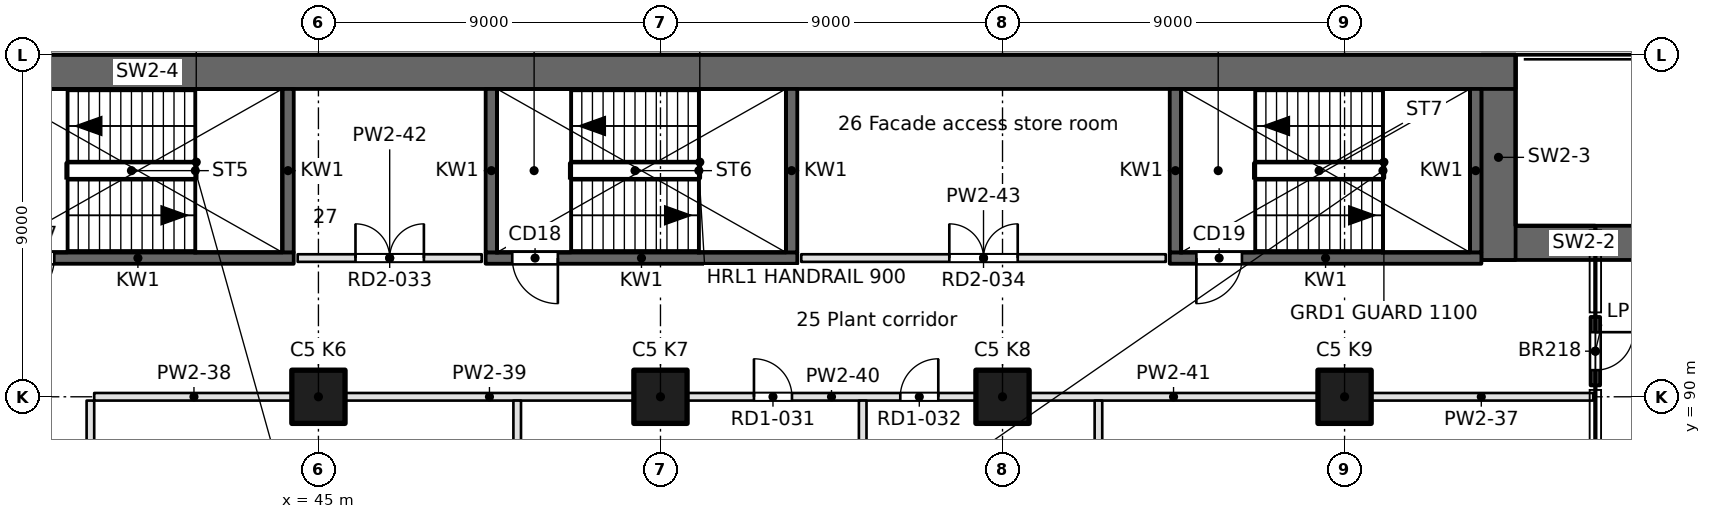
"""IFC4 building model, lengths in metres.
Left out: names, types, materials, properties, quantities, classifications, styles, units other than length and angle.
Written with IfcOpenShell. Run it as: python <this file> out.ifc"""

import sys

from ifc_helpers import new_model, si_unit, direction, frame, frame_2d, origin, origin_2d, place, context, subcontext, project, spatial, rectangle, extrude, element, fill, save


model = new_model("IFC4")
c1 = context("Model", 3, precision=1e-05, world=origin(), true_north=direction((0.0, 1.0)))
c2 = subcontext(c1, "Body", "Model", "MODEL_VIEW")
j1 = project(units=[si_unit("LENGTHUNIT", "METRE"), si_unit("PLANEANGLEUNIT", "RADIAN")], contexts=[c1])
p1 = place(None, origin())
s1 = spatial("IfcSite", under=j1, at=p1, CompositionType="ELEMENT")
p2 = place(p1, origin())
s2 = spatial("IfcBuilding", under=s1, at=p2, CompositionType="ELEMENT")
p3 = place(p2, frame((0.0, 0.0, 80.2)))
s3 = spatial("IfcBuildingStorey", under=s2, at=p3, CompositionType="ELEMENT", Elevation=80.2)
for number, where, z_axis, x_axis in (
    (1, (45.0, 90.0, 0.0), (0.0, 0.0, 1.0), (1.0, 0.0, 0.0)),
    (2, (54.0, 90.0, 0.0), (0.0, 0.0, 1.0), (1.0, 0.0, 0.0)),
    (3, (63.0, 90.0, 0.0), (0.0, 0.0, 1.0), (1.0, 0.0, 0.0)),
    (4, (72.0, 90.0, 0.0), (0.0, 0.0, 1.0), (1.0, 0.0, 0.0)),
):
    element("IfcColumn", number, at=place(p3, frame(where, z_axis=z_axis, x_axis=x_axis)), inside=s3, PredefinedType="COLUMN", context=c2, shape_type="SweptSolid", body=[
        extrude(rectangle(XDim=1.4, YDim=1.4, at=origin_2d()), origin(), (0.0, 0.0, 1.0), 4.6),
    ])
p4 = place(p3, frame((81.0, 94.05, 0.0), z_axis=(0.0, 0.0, 1.0), x_axis=(-1.0, 0.0, 0.0)))
e5 = element("IfcWall", 5, at=p4, inside=s3, PredefinedType="SHEAR", context=c2, shape_type="SweptSolid", body=[
    extrude(rectangle(XDim=5.4, YDim=0.9, at=frame_2d((2.7, 0.0))), origin(), (0.0, 0.0, 1.0), 4.6),
])
p5 = place(p3, frame((76.05, 93.6, 0.0), z_axis=(0.0, 0.0, 1.0), x_axis=(0.0, 1.0, 0.0)))
e6 = element("IfcWall", 6, at=p5, inside=s3, PredefinedType="SHEAR", context=c2, shape_type="SweptSolid", body=[
    extrude(rectangle(XDim=5.4, YDim=0.9, at=frame_2d((2.7, 0.0))), origin(), (0.0, 0.0, 1.0), 4.6),
])
p6 = place(p3, frame((76.5, 98.55, 0.0), z_axis=(0.0, 0.0, 1.0), x_axis=(-1.0, 0.0, 0.0)))
e7 = element("IfcWall", 7, at=p6, inside=s3, PredefinedType="SHEAR", context=c2, shape_type="SweptSolid", body=[
    extrude(rectangle(XDim=72.0, YDim=0.9, at=frame_2d((36.0, 0.0))), origin(), (0.0, 0.0, 1.0), 4.6),
])
p7 = place(p3, frame((78.599, 90.3, 0.0), z_axis=(0.0, 0.0, 1.0), x_axis=(0.0, 1.0, 0.0)))
e8 = element("IfcWall", 8, at=p7, inside=s3, PredefinedType="SOLIDWALL", context=c2, shape_type="SweptSolid", body=[
    extrude(rectangle(XDim=1.8, YDim=0.25, at=frame_2d((0.9, 0.0))), origin(), (0.0, 0.0, 1.0), 4.2),
])
p8 = place(p7, frame((0.4, 0.0, 0.0)))
e9 = element("IfcOpeningElement", 9, at=p8, cuts=e8, PredefinedType="OPENING", context=c2, shape_type="SweptSolid", body=[
    extrude(rectangle(XDim=1.0, YDim=2.1, at=frame_2d((0.5, 1.05))), frame((0.0, 0.125, 0.0), z_axis=(0.0, -1.0, 0.0), x_axis=(1.0, 0.0, 0.0)), (0.0, 0.0, 1.0), 0.25),
])
p9 = place(p3, frame((36.15, 93.65, -0.45), z_axis=(0.0, 0.0, 1.0), x_axis=(1.0, 0.0, 0.0)))
e10 = element("IfcWall", 10, at=p9, inside=s3, PredefinedType="SOLIDWALL", context=c2, shape_type="SweptSolid", body=[
    extrude(rectangle(XDim=8.2, YDim=0.3, at=frame_2d((4.1, 0.0))), origin(), (0.0, 0.0, 1.0), 4.65),
])
p10 = place(p9, frame((0.7, 0.0, 0.45)))
e11 = element("IfcOpeningElement", 11, at=p10, cuts=e10, PredefinedType="OPENING", context=c2, shape_type="SweptSolid", body=[
    extrude(rectangle(XDim=1.2, YDim=2.1, at=frame_2d((0.6, 1.05))), frame((0.0, 0.15, 0.0), z_axis=(0.0, -1.0, 0.0), x_axis=(1.0, 0.0, 0.0)), (0.0, 0.0, 1.0), 0.3),
])
p11 = place(p3, frame((49.4, 93.65, -0.45), z_axis=(0.0, 0.0, 1.0), x_axis=(1.0, 0.0, 0.0)))
e12 = element("IfcWall", 12, at=p11, inside=s3, PredefinedType="SOLIDWALL", context=c2, shape_type="SweptSolid", body=[
    extrude(rectangle(XDim=8.2, YDim=0.3, at=frame_2d((4.1, 0.0))), origin(), (0.0, 0.0, 1.0), 4.65),
])
p12 = place(p11, frame((0.7, 0.0, 0.45)))
e13 = element("IfcOpeningElement", 13, at=p12, cuts=e12, PredefinedType="OPENING", context=c2, shape_type="SweptSolid", body=[
    extrude(rectangle(XDim=1.2, YDim=2.1, at=frame_2d((0.6, 1.05))), frame((0.0, 0.15, 0.0), z_axis=(0.0, -1.0, 0.0), x_axis=(1.0, 0.0, 0.0)), (0.0, 0.0, 1.0), 0.3),
])
p13 = place(p3, frame((67.4, 93.65, -0.45), z_axis=(0.0, 0.0, 1.0), x_axis=(1.0, 0.0, 0.0)))
e14 = element("IfcWall", 14, at=p13, inside=s3, PredefinedType="SOLIDWALL", context=c2, shape_type="SweptSolid", body=[
    extrude(rectangle(XDim=8.2, YDim=0.3, at=frame_2d((4.1, 0.0))), origin(), (0.0, 0.0, 1.0), 4.65),
])
p14 = place(p13, frame((0.7, 0.0, 0.45)))
e15 = element("IfcOpeningElement", 15, at=p14, cuts=e14, PredefinedType="OPENING", context=c2, shape_type="SweptSolid", body=[
    extrude(rectangle(XDim=1.2, YDim=2.1, at=frame_2d((0.6, 1.05))), frame((0.0, 0.15, 0.0), z_axis=(0.0, -1.0, 0.0), x_axis=(1.0, 0.0, 0.0)), (0.0, 0.0, 1.0), 0.3),
])
for number, where, z_axis, x_axis in (
    (16, (44.2, 93.8, -0.45), (0.0, 0.0, 1.0), (0.0, 1.0, 0.0)),
    (17, (49.55, 93.8, -0.45), (0.0, 0.0, 1.0), (0.0, 1.0, 0.0)),
    (18, (57.45, 93.8, -0.45), (0.0, 0.0, 1.0), (0.0, 1.0, 0.0)),
    (19, (67.55, 93.8, -0.45), (0.0, 0.0, 1.0), (0.0, 1.0, 0.0)),
    (20, (75.45, 93.8, -0.45), (0.0, 0.0, 1.0), (0.0, 1.0, 0.0)),
):
    element("IfcWall", number, at=place(p3, frame(where, z_axis=z_axis, x_axis=x_axis)), inside=s3, PredefinedType="SOLIDWALL", context=c2, shape_type="SweptSolid", body=[
        extrude(rectangle(XDim=4.3, YDim=0.3, at=frame_2d((2.15, 0.0))), origin(), (0.0, 0.0, 1.0), 4.65),
    ])
p15 = place(p3, frame((78.545, 90.0, 0.0), z_axis=(0.0, 0.0, 1.0), x_axis=(-1.0, 0.0, 0.0)))
e21 = element("IfcWall", 21, at=p15, inside=s3, PredefinedType="PARTITIONING", context=c2, shape_type="SweptSolid", body=[
    extrude(rectangle(XDim=5.895, YDim=0.2, at=frame_2d((2.948, 0.0))), origin(), (0.0, 0.0, 1.0), 4.2),
])
p16 = place(p3, frame((44.35, 90.0, 0.0), z_axis=(0.0, 0.0, 1.0), x_axis=(-1.0, 0.0, 0.0)))
e22 = element("IfcWall", 22, at=p16, inside=s3, PredefinedType="PARTITIONING", context=c2, shape_type="SweptSolid", body=[
    extrude(rectangle(XDim=5.25, YDim=0.2, at=frame_2d((2.625, 0.0))), origin(), (0.0, 0.0, 1.0), 4.2),
])
p17 = place(p3, frame((53.35, 90.0, 0.0), z_axis=(0.0, 0.0, 1.0), x_axis=(-1.0, 0.0, 0.0)))
e23 = element("IfcWall", 23, at=p17, inside=s3, PredefinedType="PARTITIONING", context=c2, shape_type="SweptSolid", body=[
    extrude(rectangle(XDim=7.7, YDim=0.2, at=frame_2d((3.85, 0.0))), origin(), (0.0, 0.0, 1.0), 4.2),
])
p18 = place(p3, frame((62.35, 90.0, 0.0), z_axis=(0.0, 0.0, 1.0), x_axis=(-1.0, 0.0, 0.0)))
e24 = element("IfcWall", 24, at=p18, inside=s3, PredefinedType="PARTITIONING", context=c2, shape_type="SweptSolid", body=[
    extrude(rectangle(XDim=7.7, YDim=0.2, at=frame_2d((3.85, 0.0))), origin(), (0.0, 0.0, 1.0), 4.2),
])
p19 = place(p18, frame((4.89, 0.0, 0.0)))
e25 = element("IfcOpeningElement", 25, at=p19, cuts=e24, PredefinedType="OPENING", context=c2, shape_type="SweptSolid", body=[
    extrude(rectangle(XDim=1.0, YDim=2.1, at=frame_2d((0.5, 1.05))), frame((0.0, 0.1, 0.0), z_axis=(0.0, -1.0, 0.0), x_axis=(1.0, 0.0, 0.0)), (0.0, 0.0, 1.0), 0.2),
])
p20 = place(p18, frame((1.04, 0.0, 0.0)))
e26 = element("IfcOpeningElement", 26, at=p20, cuts=e24, PredefinedType="OPENING", context=c2, shape_type="SweptSolid", body=[
    extrude(rectangle(XDim=1.0, YDim=2.1, at=frame_2d((0.5, 1.05))), frame((0.0, 0.1, 0.0), z_axis=(0.0, -1.0, 0.0), x_axis=(1.0, 0.0, 0.0)), (0.0, 0.0, 1.0), 0.2),
])
p21 = place(p3, frame((71.35, 90.0, 0.0), z_axis=(0.0, 0.0, 1.0), x_axis=(-1.0, 0.0, 0.0)))
e27 = element("IfcWall", 27, at=p21, inside=s3, PredefinedType="PARTITIONING", context=c2, shape_type="SweptSolid", body=[
    extrude(rectangle(XDim=7.7, YDim=0.2, at=frame_2d((3.85, 0.0))), origin(), (0.0, 0.0, 1.0), 4.2),
])
p22 = place(p3, frame((44.454, 93.65, 0.0), z_axis=(0.0, 0.0, 1.0), x_axis=(1.0, 0.0, 0.0)))
e28 = element("IfcWall", 28, at=p22, inside=s3, PredefinedType="PARTITIONING", context=c2, shape_type="SweptSolid", body=[
    extrude(rectangle(XDim=4.842, YDim=0.2, at=frame_2d((2.421, 0.0))), origin(), (0.0, 0.0, 1.0), 4.2),
])
p23 = place(p22, frame((1.521, 0.0, 0.0)))
e29 = element("IfcOpeningElement", 29, at=p23, cuts=e28, PredefinedType="OPENING", context=c2, shape_type="SweptSolid", body=[
    extrude(rectangle(XDim=1.8, YDim=2.1, at=frame_2d((0.9, 1.05))), frame((0.0, 0.1, 0.0), z_axis=(0.0, -1.0, 0.0), x_axis=(1.0, 0.0, 0.0)), (0.0, 0.0, 1.0), 0.2),
])
p24 = place(p3, frame((57.704, 93.65, 0.0), z_axis=(0.0, 0.0, 1.0), x_axis=(1.0, 0.0, 0.0)))
e30 = element("IfcWall", 30, at=p24, inside=s3, PredefinedType="PARTITIONING", context=c2, shape_type="SweptSolid", body=[
    extrude(rectangle(XDim=9.592, YDim=0.2, at=frame_2d((4.796, 0.0))), origin(), (0.0, 0.0, 1.0), 4.2),
])
p25 = place(p24, frame((3.896, 0.0, 0.0)))
e31 = element("IfcOpeningElement", 31, at=p25, cuts=e30, PredefinedType="OPENING", context=c2, shape_type="SweptSolid", body=[
    extrude(rectangle(XDim=1.8, YDim=2.1, at=frame_2d((0.9, 1.05))), frame((0.0, 0.1, 0.0), z_axis=(0.0, -1.0, 0.0), x_axis=(1.0, 0.0, 0.0)), (0.0, 0.0, 1.0), 0.2),
])
p26 = place(p3, frame((39.0, 89.9, 0.0), z_axis=(0.0, 0.0, 1.0), x_axis=(0.0, -1.0, 0.0)))
e32 = element("IfcWall", 32, at=p26, inside=s3, PredefinedType="PARTITIONING", context=c2, shape_type="SweptSolid", body=[
    extrude(rectangle(XDim=20.92, YDim=0.2, at=frame_2d((10.46, 0.0))), origin(), (0.0, 0.0, 1.0), 4.2),
])
p27 = place(p26, frame((3.533, 0.0, 0.0)))
e33 = element("IfcOpeningElement", 33, at=p27, cuts=e32, PredefinedType="OPENING", context=c2, shape_type="SweptSolid", body=[
    extrude(rectangle(XDim=1.0, YDim=2.1, at=frame_2d((0.5, 1.05))), frame((0.0, 0.1, 0.0), z_axis=(0.0, -1.0, 0.0), x_axis=(1.0, 0.0, 0.0)), (0.0, 0.0, 1.0), 0.2),
])
for number, where, z_axis, x_axis in (
    (34, (50.23, 89.9, 0.0), (0.0, 0.0, 1.0), (0.0, -1.0, 0.0)),
    (35, (59.321, 89.9, 0.0), (0.0, 0.0, 1.0), (0.0, -1.0, 0.0)),
    (36, (65.524, 89.9, 0.0), (0.0, 0.0, 1.0), (0.0, -1.0, 0.0)),
):
    element("IfcWall", number, at=place(p3, frame(where, z_axis=z_axis, x_axis=x_axis)), inside=s3, PredefinedType="PARTITIONING", context=c2, shape_type="SweptSolid", body=[
        extrude(rectangle(XDim=7.9, YDim=0.2, at=frame_2d((3.95, 0.0))), origin(), (0.0, 0.0, 1.0), 4.2),
    ])
p28 = place(p8, frame((1.0, 0.0, 0.0), z_axis=(0.0, 0.0, 1.0), x_axis=(-1.0, 0.0, 0.0)))
e37 = element("IfcDoor", 37, at=p28, inside=s3, OperationType="SINGLE_SWING_LEFT", PredefinedType="DOOR", context=c2, shape_type="SweptSolid", body=[
    extrude(rectangle(XDim=1.0, YDim=2.1, at=frame_2d((0.5, 1.05))), frame((0.0, 0.025, 0.0), z_axis=(0.0, -1.0, 0.0), x_axis=(1.0, 0.0, 0.0)), (0.0, 0.0, 1.0), 0.05),
])
fill(e9, e37)
p29 = place(p10, frame((1.2, 0.0, 0.0), z_axis=(0.0, 0.0, 1.0), x_axis=(-1.0, 0.0, 0.0)))
e38 = element("IfcDoor", 38, at=p29, inside=s3, OperationType="SINGLE_SWING_RIGHT", PredefinedType="DOOR", context=c2, shape_type="SweptSolid", body=[
    extrude(rectangle(XDim=1.2, YDim=2.1, at=frame_2d((0.6, 1.05))), frame((0.0, 0.025, 0.0), z_axis=(0.0, -1.0, 0.0), x_axis=(1.0, 0.0, 0.0)), (0.0, 0.0, 1.0), 0.05),
])
fill(e11, e38)
p30 = place(p12, frame((1.2, 0.0, 0.0), z_axis=(0.0, 0.0, 1.0), x_axis=(-1.0, 0.0, 0.0)))
e39 = element("IfcDoor", 39, at=p30, inside=s3, OperationType="SINGLE_SWING_LEFT", PredefinedType="DOOR", context=c2, shape_type="SweptSolid", body=[
    extrude(rectangle(XDim=1.2, YDim=2.1, at=frame_2d((0.6, 1.05))), frame((0.0, 0.025, 0.0), z_axis=(0.0, -1.0, 0.0), x_axis=(1.0, 0.0, 0.0)), (0.0, 0.0, 1.0), 0.05),
])
fill(e13, e39)
p31 = place(p14, frame((1.2, 0.0, 0.0), z_axis=(0.0, 0.0, 1.0), x_axis=(-1.0, 0.0, 0.0)))
e40 = element("IfcDoor", 40, at=p31, inside=s3, OperationType="SINGLE_SWING_RIGHT", PredefinedType="DOOR", context=c2, shape_type="SweptSolid", body=[
    extrude(rectangle(XDim=1.2, YDim=2.1, at=frame_2d((0.6, 1.05))), frame((0.0, 0.025, 0.0), z_axis=(0.0, -1.0, 0.0), x_axis=(1.0, 0.0, 0.0)), (0.0, 0.0, 1.0), 0.05),
])
fill(e15, e40)
p32 = place(p19, frame((1.0, 0.0, 0.0), z_axis=(0.0, 0.0, 1.0), x_axis=(-1.0, 0.0, 0.0)))
e41 = element("IfcDoor", 41, at=p32, inside=s3, OperationType="SINGLE_SWING_LEFT", PredefinedType="DOOR", context=c2, shape_type="SweptSolid", body=[
    extrude(rectangle(XDim=1.0, YDim=2.1, at=frame_2d((0.5, 1.05))), frame((0.0, 0.025, 0.0), z_axis=(0.0, -1.0, 0.0), x_axis=(1.0, 0.0, 0.0)), (0.0, 0.0, 1.0), 0.05),
])
fill(e25, e41)
p33 = place(p20, frame((1.0, 0.0, 0.0), z_axis=(0.0, 0.0, 1.0), x_axis=(-1.0, 0.0, 0.0)))
e42 = element("IfcDoor", 42, at=p33, inside=s3, OperationType="SINGLE_SWING_RIGHT", PredefinedType="DOOR", context=c2, shape_type="SweptSolid", body=[
    extrude(rectangle(XDim=1.0, YDim=2.1, at=frame_2d((0.5, 1.05))), frame((0.0, 0.025, 0.0), z_axis=(0.0, -1.0, 0.0), x_axis=(1.0, 0.0, 0.0)), (0.0, 0.0, 1.0), 0.05),
])
fill(e26, e42)
p34 = place(p23, origin())
e43 = element("IfcDoor", 43, at=p34, inside=s3, OperationType="DOUBLE_DOOR_SINGLE_SWING", PredefinedType="DOOR", context=c2, shape_type="SweptSolid", body=[
    extrude(rectangle(XDim=1.8, YDim=2.1, at=frame_2d((0.9, 1.05))), frame((0.0, 0.025, 0.0), z_axis=(0.0, -1.0, 0.0), x_axis=(1.0, 0.0, 0.0)), (0.0, 0.0, 1.0), 0.05),
])
fill(e29, e43)
p35 = place(p25, origin())
e44 = element("IfcDoor", 44, at=p35, inside=s3, OperationType="DOUBLE_DOOR_SINGLE_SWING", PredefinedType="DOOR", context=c2, shape_type="SweptSolid", body=[
    extrude(rectangle(XDim=1.8, YDim=2.1, at=frame_2d((0.9, 1.05))), frame((0.0, 0.025, 0.0), z_axis=(0.0, -1.0, 0.0), x_axis=(1.0, 0.0, 0.0)), (0.0, 0.0, 1.0), 0.05),
])
fill(e31, e44)
save(model, sys.argv[1])
